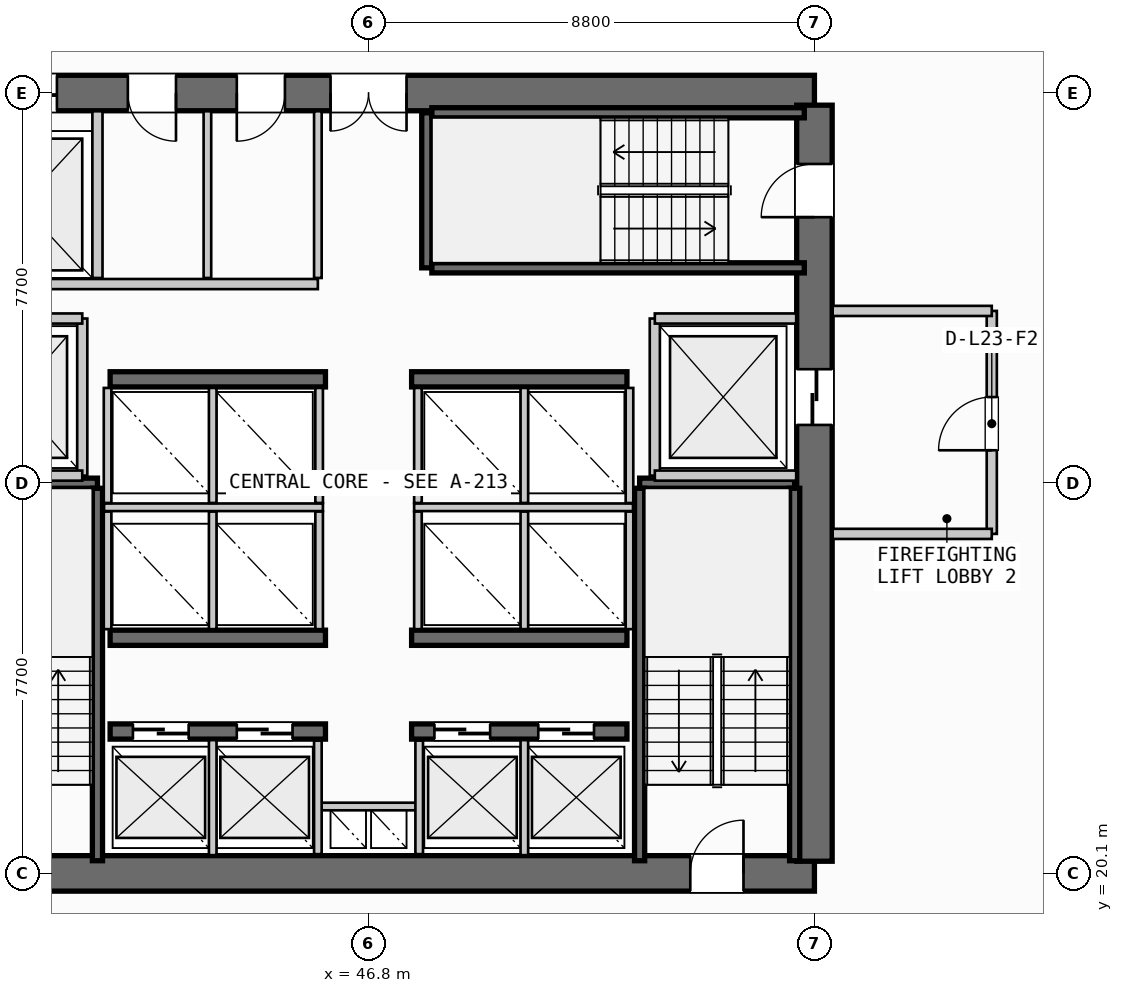
"""IFC4 building model, lengths in metres.
Left out: names, types, materials, properties, quantities, classifications, styles, units other than length and angle.
Written with IfcOpenShell. Run it as: python <this file> out.ifc"""

import sys

from ifc_helpers import new_model, si_unit, direction, frame, frame_2d, origin, place, context, subcontext, project, spatial, rectangle, extrude, source, transform, mapped, element, fill, save


model = new_model("IFC4")
c1 = context("Model", 3, precision=1e-05, world=origin(), true_north=direction((0.0, 1.0)))
c2 = subcontext(c1, "Body", "Model", "MODEL_VIEW")
j1 = project(units=[si_unit("LENGTHUNIT", "METRE"), si_unit("PLANEANGLEUNIT", "RADIAN")], contexts=[c1])
p1 = place(None, origin())
s1 = spatial("IfcSite", under=j1, at=p1, CompositionType="ELEMENT")
p2 = place(p1, origin())
s2 = spatial("IfcBuilding", under=s1, at=p2, CompositionType="ELEMENT")
p3 = place(p2, frame((0.0, 0.0, 96.4)))
s3 = spatial("IfcBuildingStorey", under=s2, at=p3, CompositionType="ELEMENT", Elevation=96.4)
p4 = place(p3, frame((38.0, 20.1, 0.0), z_axis=(0.0, 0.0, 1.0), x_axis=(1.0, 0.0, 0.0)))
e1 = element("IfcWall", 1, at=p4, inside=s3, PredefinedType="SHEAR", context=c2, shape_type="SweptSolid", body=[
    extrude(rectangle(XDim=17.6, YDim=0.7, at=frame_2d((8.8, 0.0))), origin(), (0.0, 0.0, 1.0), 3.35),
])
p5 = place(p4, frame((1.4, 0.0, 0.0)))
e2 = element("IfcOpeningElement", 2, at=p5, cuts=e1, PredefinedType="OPENING", context=c2, shape_type="SweptSolid", body=[
    extrude(rectangle(XDim=1.05, YDim=2.15, at=frame_2d((0.525, 1.075))), frame((0.0, 0.36, 0.0), z_axis=(0.0, -1.0, 0.0), x_axis=(1.0, 0.0, 0.0)), (0.0, 0.0, 1.0), 0.72),
])
p6 = place(p4, frame((15.15, 0.0, 0.0)))
e3 = element("IfcOpeningElement", 3, at=p6, cuts=e1, PredefinedType="OPENING", context=c2, shape_type="SweptSolid", body=[
    extrude(rectangle(XDim=1.05, YDim=2.15, at=frame_2d((0.525, 1.075))), frame((0.0, 0.36, 0.0), z_axis=(0.0, -1.0, 0.0), x_axis=(1.0, 0.0, 0.0)), (0.0, 0.0, 1.0), 0.72),
])
p7 = place(p3, frame((55.6, 35.5, 0.0), z_axis=(0.0, 0.0, 1.0), x_axis=(-1.0, 0.0, 0.0)))
e4 = element("IfcWall", 4, at=p7, inside=s3, PredefinedType="SHEAR", context=c2, shape_type="SweptSolid", body=[
    extrude(rectangle(XDim=17.6, YDim=0.7, at=frame_2d((8.8, 0.0))), origin(), (0.0, 0.0, 1.0), 3.35),
])
p8 = place(p7, frame((8.05, 0.0, 0.0)))
e5 = element("IfcOpeningElement", 5, at=p8, cuts=e4, PredefinedType="OPENING", context=c2, shape_type="SweptSolid", body=[
    extrude(rectangle(XDim=1.5, YDim=2.2, at=frame_2d((0.75, 1.1))), frame((0.0, 0.36, 0.0), z_axis=(0.0, -1.0, 0.0), x_axis=(1.0, 0.0, 0.0)), (0.0, 0.0, 1.0), 0.72),
])
p9 = place(p7, frame((14.95, 0.0, 0.0)))
e6 = element("IfcOpeningElement", 6, at=p9, cuts=e4, PredefinedType="OPENING", context=c2, shape_type="SweptSolid", body=[
    extrude(rectangle(XDim=1.4, YDim=2.3, at=frame_2d((0.7, 1.15))), frame((0.0, 0.36, 0.0), z_axis=(0.0, -1.0, 0.0), x_axis=(1.0, 0.0, 0.0)), (0.0, 0.0, 1.0), 0.72),
])
p10 = place(p7, frame((12.6, 0.0, 0.0)))
e7 = element("IfcOpeningElement", 7, at=p10, cuts=e4, PredefinedType="OPENING", context=c2, shape_type="SweptSolid", body=[
    extrude(rectangle(XDim=0.95, YDim=2.15, at=frame_2d((0.475, 1.075))), frame((0.0, 0.36, 0.0), z_axis=(0.0, -1.0, 0.0), x_axis=(1.0, 0.0, 0.0)), (0.0, 0.0, 1.0), 0.72),
])
p11 = place(p7, frame((10.45, 0.0, 0.0)))
e8 = element("IfcOpeningElement", 8, at=p11, cuts=e4, PredefinedType="OPENING", context=c2, shape_type="SweptSolid", body=[
    extrude(rectangle(XDim=0.95, YDim=2.15, at=frame_2d((0.475, 1.075))), frame((0.0, 0.36, 0.0), z_axis=(0.0, -1.0, 0.0), x_axis=(1.0, 0.0, 0.0)), (0.0, 0.0, 1.0), 0.72),
])
p12 = place(p3, frame((55.6, 20.34, 0.0), z_axis=(0.0, 0.0, 1.0), x_axis=(0.0, 1.0, 0.0)))
e9 = element("IfcWall", 9, at=p12, inside=s3, PredefinedType="SHEAR", context=c2, shape_type="SweptSolid", body=[
    extrude(rectangle(XDim=14.92, YDim=0.7, at=frame_2d((7.46, 0.0))), origin(), (0.0, 0.0, 1.0), 3.35),
])
p13 = place(p12, frame((12.71, 0.0, 0.0)))
e10 = element("IfcOpeningElement", 10, at=p13, cuts=e9, PredefinedType="OPENING", context=c2, shape_type="SweptSolid", body=[
    extrude(rectangle(XDim=1.05, YDim=2.15, at=frame_2d((0.525, 1.075))), frame((0.0, 0.36, 0.0), z_axis=(0.0, -1.0, 0.0), x_axis=(1.0, 0.0, 0.0)), (0.0, 0.0, 1.0), 0.72),
])
p14 = place(p12, frame((8.61, 0.0, 0.0)))
e11 = element("IfcOpeningElement", 11, at=p14, cuts=e9, PredefinedType="OPENING", context=c2, shape_type="SweptSolid", body=[
    extrude(rectangle(XDim=1.1, YDim=2.2, at=frame_2d((0.55, 1.1))), frame((0.0, 0.36, 0.0), z_axis=(0.0, -1.0, 0.0), x_axis=(1.0, 0.0, 0.0)), (0.0, 0.0, 1.0), 0.72),
])
p15 = place(p3, frame((41.7, 22.9, 0.0), z_axis=(0.0, 0.0, 1.0), x_axis=(1.0, 0.0, 0.0)))
e12 = element("IfcWall", 12, at=p15, inside=s3, PredefinedType="SHEAR", context=c2, shape_type="SweptSolid", body=[
    extrude(rectangle(XDim=4.25, YDim=0.3, at=frame_2d((2.125, 0.0))), origin(), (0.0, 0.0, 1.0), 3.35),
])
p16 = place(p15, frame((0.45, 0.0, 0.0)))
e13 = element("IfcOpeningElement", 13, at=p16, cuts=e12, PredefinedType="OPENING", context=c2, shape_type="SweptSolid", body=[
    extrude(rectangle(XDim=1.1, YDim=2.2, at=frame_2d((0.55, 1.1))), frame((0.0, 0.16, 0.0), z_axis=(0.0, -1.0, 0.0), x_axis=(1.0, 0.0, 0.0)), (0.0, 0.0, 1.0), 0.32),
])
p17 = place(p15, frame((2.5, 0.0, 0.0)))
e14 = element("IfcOpeningElement", 14, at=p17, cuts=e12, PredefinedType="OPENING", context=c2, shape_type="SweptSolid", body=[
    extrude(rectangle(XDim=1.1, YDim=2.2, at=frame_2d((0.55, 1.1))), frame((0.0, 0.16, 0.0), z_axis=(0.0, -1.0, 0.0), x_axis=(1.0, 0.0, 0.0)), (0.0, 0.0, 1.0), 0.32),
])
p18 = place(p3, frame((47.65, 22.9, 0.0), z_axis=(0.0, 0.0, 1.0), x_axis=(1.0, 0.0, 0.0)))
e15 = element("IfcWall", 15, at=p18, inside=s3, PredefinedType="SHEAR", context=c2, shape_type="SweptSolid", body=[
    extrude(rectangle(XDim=4.25, YDim=0.3, at=frame_2d((2.125, 0.0))), origin(), (0.0, 0.0, 1.0), 3.35),
])
p19 = place(p18, frame((0.45, 0.0, 0.0)))
e16 = element("IfcOpeningElement", 16, at=p19, cuts=e15, PredefinedType="OPENING", context=c2, shape_type="SweptSolid", body=[
    extrude(rectangle(XDim=1.1, YDim=2.2, at=frame_2d((0.55, 1.1))), frame((0.0, 0.16, 0.0), z_axis=(0.0, -1.0, 0.0), x_axis=(1.0, 0.0, 0.0)), (0.0, 0.0, 1.0), 0.32),
])
p20 = place(p18, frame((2.5, 0.0, 0.0)))
e17 = element("IfcOpeningElement", 17, at=p20, cuts=e15, PredefinedType="OPENING", context=c2, shape_type="SweptSolid", body=[
    extrude(rectangle(XDim=1.1, YDim=2.2, at=frame_2d((0.55, 1.1))), frame((0.0, 0.16, 0.0), z_axis=(0.0, -1.0, 0.0), x_axis=(1.0, 0.0, 0.0)), (0.0, 0.0, 1.0), 0.32),
])
for number, where, z_axis, x_axis in (
    (18, (41.7, 24.75, 0.0), (0.0, 0.0, 1.0), (1.0, 0.0, 0.0)),
    (19, (47.65, 24.75, 0.0), (0.0, 0.0, 1.0), (1.0, 0.0, 0.0)),
    (20, (41.7, 29.85, 0.0), (0.0, 0.0, 1.0), (1.0, 0.0, 0.0)),
    (21, (47.65, 29.85, 0.0), (0.0, 0.0, 1.0), (1.0, 0.0, 0.0)),
):
    element("IfcWall", number, at=place(p3, frame(where, z_axis=z_axis, x_axis=x_axis)), inside=s3, PredefinedType="SHEAR", context=c2, shape_type="SweptSolid", body=[
        extrude(rectangle(XDim=4.25, YDim=0.3, at=frame_2d((2.125, 0.0))), origin(), (0.0, 0.0, 1.0), 3.35),
    ])
p21 = place(p3, frame((38.39, 27.8, 0.0), z_axis=(0.0, 0.0, 1.0), x_axis=(1.0, 0.0, 0.0)))
e22 = element("IfcWall", 22, at=p21, inside=s3, PredefinedType="SHEAR", context=c2, shape_type="SweptSolid", body=[
    extrude(rectangle(XDim=3.06, YDim=0.2, at=frame_2d((1.53, 0.0))), origin(), (0.0, 0.0, 1.0), 3.35),
])
p22 = place(p3, frame((41.45, 27.7, 0.0), z_axis=(0.0, 0.0, 1.0), x_axis=(0.0, -1.0, 0.0)))
e23 = element("IfcWall", 23, at=p22, inside=s3, PredefinedType="SHEAR", context=c2, shape_type="SweptSolid", body=[
    extrude(rectangle(XDim=7.35, YDim=0.2, at=frame_2d((3.675, 0.0))), origin(), (0.0, 0.0, 1.0), 3.35),
])
p23 = place(p3, frame((52.15, 27.8, 0.0), z_axis=(0.0, 0.0, 1.0), x_axis=(1.0, 0.0, 0.0)))
e24 = element("IfcWall", 24, at=p23, inside=s3, PredefinedType="SHEAR", context=c2, shape_type="SweptSolid", body=[
    extrude(rectangle(XDim=3.06, YDim=0.2, at=frame_2d((1.53, 0.0))), origin(), (0.0, 0.0, 1.0), 3.35),
])
for number, where, z_axis, x_axis in (
    (25, (55.21, 27.7, 0.0), (0.0, 0.0, 1.0), (0.0, -1.0, 0.0)),
    (26, (52.15, 20.35, 0.0), (0.0, 0.0, 1.0), (0.0, 1.0, 0.0)),
):
    element("IfcWall", number, at=place(p3, frame(where, z_axis=z_axis, x_axis=x_axis)), inside=s3, PredefinedType="SHEAR", context=c2, shape_type="SweptSolid", body=[
        extrude(rectangle(XDim=7.35, YDim=0.2, at=frame_2d((3.675, 0.0))), origin(), (0.0, 0.0, 1.0), 3.35),
    ])
p24 = place(p3, frame((47.95, 32.05, 0.0), z_axis=(0.0, 0.0, 1.0), x_axis=(0.0, 1.0, 0.0)))
e27 = element("IfcWall", 27, at=p24, inside=s3, PredefinedType="SHEAR", context=c2, shape_type="SweptSolid", body=[
    extrude(rectangle(XDim=3.06, YDim=0.2, at=frame_2d((1.53, 0.0))), origin(), (0.0, 0.0, 1.0), 3.35),
])
for number, where, z_axis, x_axis in (
    (28, (48.05, 35.11, 0.0), (0.0, 0.0, 1.0), (1.0, 0.0, 0.0)),
    (29, (55.4, 32.05, 0.0), (0.0, 0.0, 1.0), (-1.0, 0.0, 0.0)),
):
    element("IfcWall", number, at=place(p3, frame(where, z_axis=z_axis, x_axis=x_axis)), inside=s3, PredefinedType="SHEAR", context=c2, shape_type="SweptSolid", body=[
        extrude(rectangle(XDim=7.35, YDim=0.2, at=frame_2d((3.675, 0.0))), origin(), (0.0, 0.0, 1.0), 3.35),
    ])
p25 = place(p3, frame((45.8, 21.42, 0.0), z_axis=(0.0, 0.0, 1.0), x_axis=(1.0, 0.0, 0.0)))
e30 = element("IfcWall", 30, at=p25, inside=s3, PredefinedType="PARTITIONING", context=c2, shape_type="SweptSolid", body=[
    extrude(rectangle(XDim=2.0, YDim=0.15, at=frame_2d((1.0, 0.0))), origin(), (0.0, 0.0, 1.0), 2.28),
])
for number, where, z_axis, x_axis in (
    (31, (45.8, 20.48, 0.0), (0.0, 0.0, 1.0), (0.0, 1.0, 0.0)),
    (32, (47.8, 20.48, 0.0), (0.0, 0.0, 1.0), (0.0, 1.0, 0.0)),
):
    element("IfcWall", number, at=place(p3, frame(where, z_axis=z_axis, x_axis=x_axis)), inside=s3, PredefinedType="PARTITIONING", context=c2, shape_type="SweptSolid", body=[
        extrude(rectangle(XDim=2.24, YDim=0.15, at=frame_2d((1.12, 0.0))), origin(), (0.0, 0.0, 1.0), 2.28),
    ])
p26 = place(p3, frame((41.15, 27.95, 0.0), z_axis=(0.0, 0.0, 1.0), x_axis=(0.0, 1.0, 0.0)))
e33 = element("IfcWall", 33, at=p26, inside=s3, PredefinedType="PARTITIONING", context=c2, shape_type="SweptSolid", body=[
    extrude(rectangle(XDim=3.1, YDim=0.2, at=frame_2d((1.55, 0.0))), origin(), (0.0, 0.0, 1.0), 2.28),
])
for number, where, z_axis, x_axis in (
    (34, (38.36, 27.95, 0.0), (0.0, 0.0, 1.0), (1.0, 0.0, 0.0)),
    (35, (38.36, 31.05, 0.0), (0.0, 0.0, 1.0), (1.0, 0.0, 0.0)),
):
    element("IfcWall", number, at=place(p3, frame(where, z_axis=z_axis, x_axis=x_axis)), inside=s3, PredefinedType="PARTITIONING", context=c2, shape_type="SweptSolid", body=[
        extrude(rectangle(XDim=2.79, YDim=0.2, at=frame_2d((1.395, 0.0))), origin(), (0.0, 0.0, 1.0), 2.28),
    ])
p27 = place(p3, frame((52.45, 27.95, 0.0), z_axis=(0.0, 0.0, 1.0), x_axis=(0.0, 1.0, 0.0)))
e36 = element("IfcWall", 36, at=p27, inside=s3, PredefinedType="PARTITIONING", context=c2, shape_type="SweptSolid", body=[
    extrude(rectangle(XDim=3.1, YDim=0.2, at=frame_2d((1.55, 0.0))), origin(), (0.0, 0.0, 1.0), 2.28),
])
for number, where, z_axis, x_axis in (
    (37, (52.45, 27.95, 0.0), (0.0, 0.0, 1.0), (1.0, 0.0, 0.0)),
    (38, (52.45, 31.05, 0.0), (0.0, 0.0, 1.0), (1.0, 0.0, 0.0)),
):
    element("IfcWall", number, at=place(p3, frame(where, z_axis=z_axis, x_axis=x_axis)), inside=s3, PredefinedType="PARTITIONING", context=c2, shape_type="SweptSolid", body=[
        extrude(rectangle(XDim=2.79, YDim=0.2, at=frame_2d((1.395, 0.0))), origin(), (0.0, 0.0, 1.0), 2.28),
    ])
p28 = place(p3, frame((59.1, 26.8, 0.0), z_axis=(0.0, 0.0, 1.0), x_axis=(0.0, 1.0, 0.0)))
e39 = element("IfcWall", 39, at=p28, inside=s3, PredefinedType="PARTITIONING", context=c2, shape_type="SweptSolid", body=[
    extrude(rectangle(XDim=4.4, YDim=0.2, at=frame_2d((2.2, 0.0))), origin(), (0.0, 0.0, 1.0), 2.28),
])
p29 = place(p28, frame((1.65, 0.0, 0.0)))
e40 = element("IfcOpeningElement", 40, at=p29, cuts=e39, PredefinedType="OPENING", context=c2, shape_type="SweptSolid", body=[
    extrude(rectangle(XDim=1.05, YDim=2.15, at=frame_2d((0.525, 1.075))), frame((0.0, 0.11, 0.0), z_axis=(0.0, -1.0, 0.0), x_axis=(1.0, 0.0, 0.0)), (0.0, 0.0, 1.0), 0.22),
])
for number, where, z_axis, x_axis in (
    (41, (55.96, 26.8, 0.0), (0.0, 0.0, 1.0), (1.0, 0.0, 0.0)),
    (42, (55.96, 31.2, 0.0), (0.0, 0.0, 1.0), (1.0, 0.0, 0.0)),
):
    element("IfcWall", number, at=place(p3, frame(where, z_axis=z_axis, x_axis=x_axis)), inside=s3, PredefinedType="PARTITIONING", context=c2, shape_type="SweptSolid", body=[
        extrude(rectangle(XDim=3.14, YDim=0.2, at=frame_2d((1.57, 0.0))), origin(), (0.0, 0.0, 1.0), 2.28),
    ])
for number, where, z_axis, x_axis in (
    (43, (43.725, 20.46, 0.0), (0.0, 0.0, 1.0), (0.0, 1.0, 0.0)),
    (44, (49.875, 20.46, 0.0), (0.0, 0.0, 1.0), (0.0, 1.0, 0.0)),
):
    element("IfcWall", number, at=place(p3, frame(where, z_axis=z_axis, x_axis=x_axis)), inside=s3, PredefinedType="PARTITIONING", context=c2, shape_type="SweptSolid", body=[
        extrude(rectangle(XDim=2.27, YDim=0.15, at=frame_2d((1.135, 0.0))), origin(), (0.0, 0.0, 1.0), 2.28),
    ])
p30 = place(p3, frame((41.58, 27.325, 0.0), z_axis=(0.0, 0.0, 1.0), x_axis=(1.0, 0.0, 0.0)))
e45 = element("IfcWall", 45, at=p30, inside=s3, PredefinedType="PARTITIONING", context=c2, shape_type="SweptSolid", body=[
    extrude(rectangle(XDim=4.32, YDim=0.15, at=frame_2d((2.16, 0.0))), origin(), (0.0, 0.0, 1.0), 2.28),
])
p31 = place(p3, frame((47.7, 27.325, 0.0), z_axis=(0.0, 0.0, 1.0), x_axis=(1.0, 0.0, 0.0)))
e46 = element("IfcWall", 46, at=p31, inside=s3, PredefinedType="PARTITIONING", context=c2, shape_type="SweptSolid", body=[
    extrude(rectangle(XDim=4.32, YDim=0.15, at=frame_2d((2.16, 0.0))), origin(), (0.0, 0.0, 1.0), 2.28),
])
for number, where, z_axis, x_axis in (
    (47, (41.65, 24.92, 0.0), (0.0, 0.0, 1.0), (0.0, 1.0, 0.0)),
    (48, (43.725, 24.92, 0.0), (0.0, 0.0, 1.0), (0.0, 1.0, 0.0)),
    (49, (45.825, 24.92, 0.0), (0.0, 0.0, 1.0), (0.0, 1.0, 0.0)),
    (50, (47.775, 24.92, 0.0), (0.0, 0.0, 1.0), (0.0, 1.0, 0.0)),
    (51, (49.875, 24.92, 0.0), (0.0, 0.0, 1.0), (0.0, 1.0, 0.0)),
    (52, (51.95, 24.92, 0.0), (0.0, 0.0, 1.0), (0.0, 1.0, 0.0)),
):
    element("IfcWall", number, at=place(p3, frame(where, z_axis=z_axis, x_axis=x_axis)), inside=s3, PredefinedType="PARTITIONING", context=c2, shape_type="SweptSolid", body=[
        extrude(rectangle(XDim=2.32, YDim=0.15, at=frame_2d((1.16, 0.0))), origin(), (0.0, 0.0, 1.0), 2.28),
    ])
for number, where, z_axis, x_axis in (
    (53, (41.65, 27.41, 0.0), (0.0, 0.0, 1.0), (0.0, 1.0, 0.0)),
    (54, (43.725, 27.41, 0.0), (0.0, 0.0, 1.0), (0.0, 1.0, 0.0)),
    (55, (45.825, 27.41, 0.0), (0.0, 0.0, 1.0), (0.0, 1.0, 0.0)),
    (56, (47.775, 27.41, 0.0), (0.0, 0.0, 1.0), (0.0, 1.0, 0.0)),
    (57, (49.875, 27.41, 0.0), (0.0, 0.0, 1.0), (0.0, 1.0, 0.0)),
    (58, (51.95, 27.41, 0.0), (0.0, 0.0, 1.0), (0.0, 1.0, 0.0)),
):
    element("IfcWall", number, at=place(p3, frame(where, z_axis=z_axis, x_axis=x_axis)), inside=s3, PredefinedType="PARTITIONING", context=c2, shape_type="SweptSolid", body=[
        extrude(rectangle(XDim=2.27, YDim=0.15, at=frame_2d((1.135, 0.0))), origin(), (0.0, 0.0, 1.0), 2.28),
    ])
p32 = place(p3, frame((41.45, 31.85, 0.0), z_axis=(0.0, 0.0, 1.0), x_axis=(0.0, 1.0, 0.0)))
e59 = element("IfcWall", 59, at=p32, inside=s3, PredefinedType="PARTITIONING", context=c2, shape_type="SweptSolid", body=[
    extrude(rectangle(XDim=3.29, YDim=0.2, at=frame_2d((1.645, 0.0))), origin(), (0.0, 0.0, 1.0), 2.28),
])
p33 = place(p3, frame((38.36, 31.73, 0.0), z_axis=(0.0, 0.0, 1.0), x_axis=(1.0, 0.0, 0.0)))
e60 = element("IfcWall", 60, at=p33, inside=s3, PredefinedType="PARTITIONING", context=c2, shape_type="SweptSolid", body=[
    extrude(rectangle(XDim=7.44, YDim=0.2, at=frame_2d((3.72, 0.0))), origin(), (0.0, 0.0, 1.0), 2.28),
])
p34 = place(p3, frame((45.8, 31.85, 0.0), z_axis=(0.0, 0.0, 1.0), x_axis=(0.0, 1.0, 0.0)))
e61 = element("IfcWall", 61, at=p34, inside=s3, PredefinedType="PARTITIONING", context=c2, shape_type="SweptSolid", body=[
    extrude(rectangle(XDim=3.29, YDim=0.15, at=frame_2d((1.645, 0.0))), origin(), (0.0, 0.0, 1.0), 2.28),
])
p35 = place(p3, frame((43.62, 31.85, 0.0), z_axis=(0.0, 0.0, 1.0), x_axis=(0.0, 1.0, 0.0)))
e62 = element("IfcWall", 62, at=p35, inside=s3, PredefinedType="PLUMBINGWALL", context=c2, shape_type="SweptSolid", body=[
    extrude(rectangle(XDim=3.29, YDim=0.15, at=frame_2d((1.645, 0.0))), origin(), (0.0, 0.0, 1.0), 2.28),
])
m1 = source(origin(), c2, "Body", "SweptSolid", [
    extrude(rectangle(XDim=1.05, YDim=2.15, at=frame_2d((0.525, 1.075))), frame((0.0, 0.025, 0.0), z_axis=(0.0, -1.0, 0.0), x_axis=(1.0, 0.0, 0.0)), (0.0, 0.0, 1.0), 0.05),
])
p36 = place(p6, origin())
e63 = element("IfcDoor", 63, at=p36, inside=s3, OperationType="SINGLE_SWING_RIGHT", PredefinedType="DOOR", context=c2, shape_type="MappedRepresentation", body=[
    mapped(m1, transform((0.0, 0.0, 0.0), scale=1.0)),
])
fill(e3, e63)
p37 = place(p13, origin())
e64 = element("IfcDoor", 64, at=p37, inside=s3, OperationType="SINGLE_SWING_LEFT", PredefinedType="DOOR", context=c2, shape_type="MappedRepresentation", body=[
    mapped(m1, transform((0.0, 0.0, 0.0), scale=1.0)),
])
fill(e10, e64)
m2 = source(origin(), c2, "Body", "SweptSolid", [
    extrude(rectangle(XDim=1.5, YDim=2.2, at=frame_2d((0.75, 1.1))), frame((0.0, 0.025, 0.0), z_axis=(0.0, -1.0, 0.0), x_axis=(1.0, 0.0, 0.0)), (0.0, 0.0, 1.0), 0.05),
])
p38 = place(p8, origin())
e65 = element("IfcDoor", 65, at=p38, inside=s3, OperationType="DOUBLE_DOOR_SINGLE_SWING", PredefinedType="DOOR", context=c2, shape_type="MappedRepresentation", body=[
    mapped(m2, transform((0.0, 0.0, 0.0), scale=1.0)),
])
fill(e5, e65)
m3 = source(origin(), c2, "Body", "SweptSolid", [
    extrude(rectangle(XDim=1.1, YDim=2.2, at=frame_2d((0.55, 1.1))), frame((0.0, 0.025, 0.0), z_axis=(0.0, -1.0, 0.0), x_axis=(1.0, 0.0, 0.0)), (0.0, 0.0, 1.0), 0.05),
])
p39 = place(p14, origin())
e66 = element("IfcDoor", 66, at=p39, inside=s3, OperationType="SLIDING_TO_RIGHT", PredefinedType="DOOR", context=c2, shape_type="MappedRepresentation", body=[
    mapped(m3, transform((0.0, 0.0, 0.0), scale=1.0)),
])
fill(e11, e66)
p40 = place(p16, origin())
e67 = element("IfcDoor", 67, at=p40, inside=s3, OperationType="SLIDING_TO_LEFT", PredefinedType="DOOR", context=c2, shape_type="MappedRepresentation", body=[
    mapped(m3, transform((0.0, 0.0, 0.0), scale=1.0)),
])
fill(e13, e67)
p41 = place(p17, origin())
e68 = element("IfcDoor", 68, at=p41, inside=s3, OperationType="SLIDING_TO_LEFT", PredefinedType="DOOR", context=c2, shape_type="MappedRepresentation", body=[
    mapped(m3, transform((0.0, 0.0, 0.0), scale=1.0)),
])
fill(e14, e68)
p42 = place(p19, origin())
e69 = element("IfcDoor", 69, at=p42, inside=s3, OperationType="SLIDING_TO_LEFT", PredefinedType="DOOR", context=c2, shape_type="MappedRepresentation", body=[
    mapped(m3, transform((0.0, 0.0, 0.0), scale=1.0)),
])
fill(e16, e69)
p43 = place(p20, origin())
e70 = element("IfcDoor", 70, at=p43, inside=s3, OperationType="SLIDING_TO_LEFT", PredefinedType="DOOR", context=c2, shape_type="MappedRepresentation", body=[
    mapped(m3, transform((0.0, 0.0, 0.0), scale=1.0)),
])
fill(e17, e70)
m4 = source(origin(), c2, "Body", "SweptSolid", [
    extrude(rectangle(XDim=1.4, YDim=2.3, at=frame_2d((0.7, 1.15))), frame((0.0, 0.025, 0.0), z_axis=(0.0, -1.0, 0.0), x_axis=(1.0, 0.0, 0.0)), (0.0, 0.0, 1.0), 0.05),
])
p44 = place(p9, origin())
e71 = element("IfcDoor", 71, at=p44, inside=s3, OperationType="SLIDING_TO_RIGHT", PredefinedType="DOOR", context=c2, shape_type="MappedRepresentation", body=[
    mapped(m4, transform((0.0, 0.0, 0.0), scale=1.0)),
])
fill(e6, e71)
m5 = source(origin(), c2, "Body", "SweptSolid", [
    extrude(rectangle(XDim=0.95, YDim=2.15, at=frame_2d((0.475, 1.075))), frame((0.0, 0.025, 0.0), z_axis=(0.0, -1.0, 0.0), x_axis=(1.0, 0.0, 0.0)), (0.0, 0.0, 1.0), 0.05),
])
p45 = place(p10, origin())
e72 = element("IfcDoor", 72, at=p45, inside=s3, OperationType="SINGLE_SWING_LEFT", PredefinedType="DOOR", context=c2, shape_type="MappedRepresentation", body=[
    mapped(m5, transform((0.0, 0.0, 0.0), scale=1.0)),
])
fill(e7, e72)
p46 = place(p11, origin())
e73 = element("IfcDoor", 73, at=p46, inside=s3, OperationType="SINGLE_SWING_RIGHT", PredefinedType="DOOR", context=c2, shape_type="MappedRepresentation", body=[
    mapped(m5, transform((0.0, 0.0, 0.0), scale=1.0)),
])
fill(e8, e73)
p47 = place(p29, origin())
e74 = element("IfcDoor", 74, at=p47, inside=s3, OperationType="SINGLE_SWING_LEFT", PredefinedType="DOOR", context=c2, shape_type="MappedRepresentation", body=[
    mapped(m1, transform((0.0, 0.0, 0.0), scale=1.0)),
])
fill(e40, e74)
save(model, sys.argv[1])
